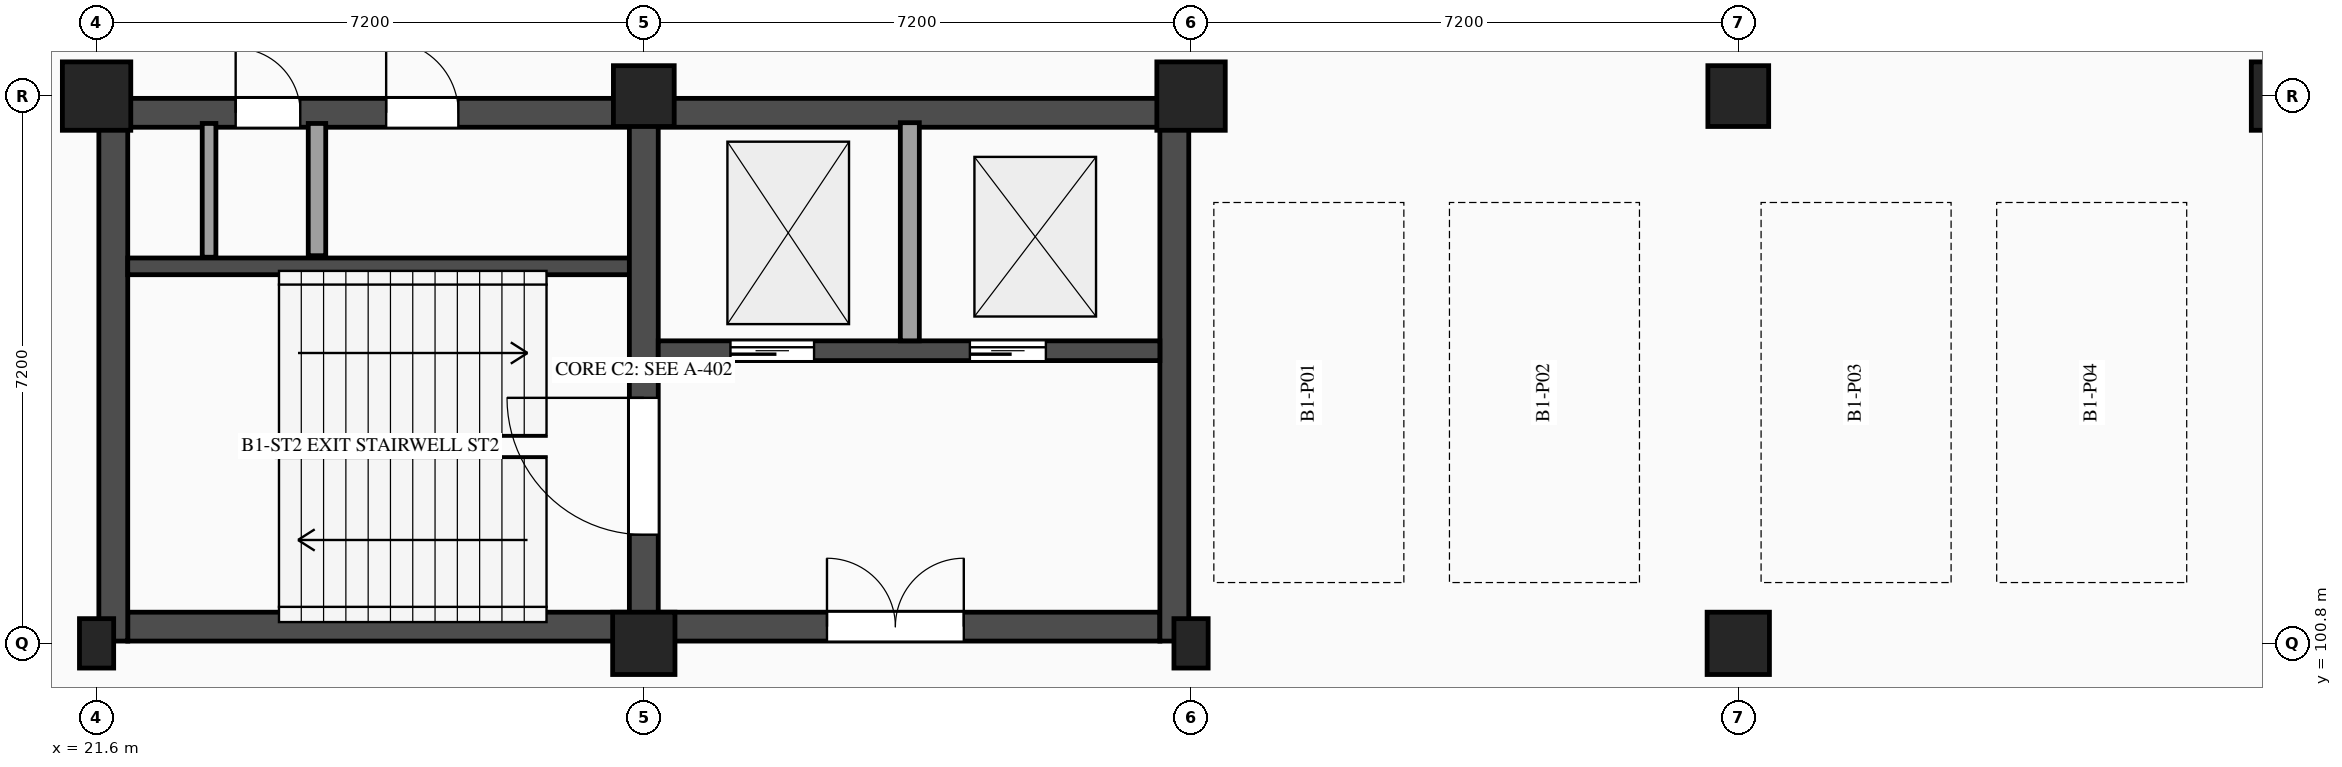
"""IFC4 building model, lengths in metres.
Left out: names, types, materials, properties, quantities, classifications, styles, units other than length and angle.
Written with IfcOpenShell. Run it as: python <this file> out.ifc"""

import sys

from ifc_helpers import new_model, si_unit, direction, frame, frame_2d, origin, origin_2d, place, context, subcontext, project, spatial, rectangle, extrude, element, fill, save


model = new_model("IFC4")
c1 = context("Model", 3, precision=1e-05, world=origin(), true_north=direction((0.0, 1.0)))
c2 = subcontext(c1, "Body", "Model", "MODEL_VIEW")
j1 = project(units=[si_unit("LENGTHUNIT", "METRE"), si_unit("PLANEANGLEUNIT", "RADIAN")], contexts=[c1])
p1 = place(None, origin())
s1 = spatial("IfcSite", under=j1, at=p1, CompositionType="ELEMENT")
p2 = place(p1, origin())
s2 = spatial("IfcBuilding", under=s1, at=p2, CompositionType="ELEMENT")
p3 = place(p2, frame((0.0, 0.0, -4.5)))
s3 = spatial("IfcBuildingStorey", under=s2, at=p3, CompositionType="ELEMENT", Elevation=-4.5)
p4 = place(p3, frame((21.6, 100.8, -0.45), z_axis=(0.0, 0.0, 1.0), x_axis=(1.0, 0.0, 0.0)))
e1 = element("IfcColumn", 1, at=p4, inside=s3, PredefinedType="PILASTER", context=c2, shape_type="SweptSolid", body=[
    extrude(rectangle(XDim=0.45, YDim=0.65, at=origin_2d()), origin(), (0.0, 0.0, 1.0), 4.95),
])
p5 = place(p3, frame((21.6, 108.0, -0.45), z_axis=(0.0, 0.0, 1.0), x_axis=(1.0, 0.0, 0.0)))
e2 = element("IfcColumn", 2, at=p5, inside=s3, PredefinedType="COLUMN", context=c2, shape_type="SweptSolid", body=[
    extrude(rectangle(XDim=0.9, YDim=0.9, at=origin_2d()), origin(), (0.0, 0.0, 1.0), 4.95),
])
p6 = place(p3, frame((28.8, 100.8, -0.45), z_axis=(0.0, 0.0, 1.0), x_axis=(1.0, 0.0, 0.0)))
e3 = element("IfcColumn", 3, at=p6, inside=s3, PredefinedType="COLUMN", context=c2, shape_type="SweptSolid", body=[
    extrude(rectangle(XDim=0.82, YDim=0.82, at=origin_2d()), origin(), (0.0, 0.0, 1.0), 4.95),
])
p7 = place(p3, frame((28.8, 108.0, -0.45), z_axis=(0.0, 0.0, 1.0), x_axis=(1.0, 0.0, 0.0)))
e4 = element("IfcColumn", 4, at=p7, inside=s3, PredefinedType="COLUMN", context=c2, shape_type="SweptSolid", body=[
    extrude(rectangle(XDim=0.8, YDim=0.8, at=origin_2d()), origin(), (0.0, 0.0, 1.0), 4.95),
])
p8 = place(p3, frame((36.0, 100.8, -0.45), z_axis=(0.0, 0.0, 1.0), x_axis=(1.0, 0.0, 0.0)))
e5 = element("IfcColumn", 5, at=p8, inside=s3, PredefinedType="PILASTER", context=c2, shape_type="SweptSolid", body=[
    extrude(rectangle(XDim=0.45, YDim=0.65, at=origin_2d()), origin(), (0.0, 0.0, 1.0), 4.95),
])
p9 = place(p3, frame((36.0, 108.0, -0.45), z_axis=(0.0, 0.0, 1.0), x_axis=(1.0, 0.0, 0.0)))
e6 = element("IfcColumn", 6, at=p9, inside=s3, PredefinedType="COLUMN", context=c2, shape_type="SweptSolid", body=[
    extrude(rectangle(XDim=0.9, YDim=0.9, at=origin_2d()), origin(), (0.0, 0.0, 1.0), 4.95),
])
p10 = place(p3, frame((43.2, 100.8, -0.45), z_axis=(0.0, 0.0, 1.0), x_axis=(1.0, 0.0, 0.0)))
e7 = element("IfcColumn", 7, at=p10, inside=s3, PredefinedType="COLUMN", context=c2, shape_type="SweptSolid", body=[
    extrude(rectangle(XDim=0.82, YDim=0.82, at=origin_2d()), origin(), (0.0, 0.0, 1.0), 4.95),
])
p11 = place(p3, frame((43.2, 108.0, -0.45), z_axis=(0.0, 0.0, 1.0), x_axis=(1.0, 0.0, 0.0)))
e8 = element("IfcColumn", 8, at=p11, inside=s3, PredefinedType="COLUMN", context=c2, shape_type="SweptSolid", body=[
    extrude(rectangle(XDim=0.8, YDim=0.8, at=origin_2d()), origin(), (0.0, 0.0, 1.0), 4.95),
])
p12 = place(p3, frame((50.4, 108.0, -0.45), z_axis=(0.0, 0.0, 1.0), x_axis=(1.0, 0.0, 0.0)))
e9 = element("IfcColumn", 9, at=p12, inside=s3, PredefinedType="COLUMN", context=c2, shape_type="SweptSolid", body=[
    extrude(rectangle(XDim=0.9, YDim=0.9, at=origin_2d()), origin(), (0.0, 0.0, 1.0), 4.95),
])
p13 = place(p3, frame((22.01, 101.02, 0.0), z_axis=(0.0, 0.0, 1.0), x_axis=(1.0, 0.0, 0.0)))
e10 = element("IfcWall", 10, at=p13, inside=s3, PredefinedType="SHEAR", context=c2, shape_type="SweptSolid", body=[
    extrude(rectangle(XDim=6.6, YDim=0.38, at=frame_2d((3.3, 0.0))), origin(), (0.0, 0.0, 1.0), 4.17),
])
p14 = place(p3, frame((21.82, 107.97, 0.0), z_axis=(0.0, 0.0, 1.0), x_axis=(0.0, -1.0, 0.0)))
e11 = element("IfcWall", 11, at=p14, inside=s3, PredefinedType="SHEAR", context=c2, shape_type="SweptSolid", body=[
    extrude(rectangle(XDim=7.14, YDim=0.38, at=frame_2d((3.57, 0.0))), origin(), (0.0, 0.0, 1.0), 4.17),
])
p15 = place(p3, frame((22.01, 107.78, 0.0), z_axis=(0.0, 0.0, 1.0), x_axis=(1.0, 0.0, 0.0)))
e12 = element("IfcWall", 12, at=p15, inside=s3, PredefinedType="SHEAR", context=c2, shape_type="SweptSolid", body=[
    extrude(rectangle(XDim=6.6, YDim=0.38, at=frame_2d((3.3, 0.0))), origin(), (0.0, 0.0, 1.0), 4.17),
])
p16 = place(p15, frame((1.42, 0.0, 0.0)))
e13 = element("IfcOpeningElement", 13, at=p16, cuts=e12, PredefinedType="OPENING", context=c2, shape_type="SweptSolid", body=[
    extrude(rectangle(XDim=0.85, YDim=2.1, at=frame_2d((0.425, 1.05))), frame((0.0, 0.2, 0.0), z_axis=(0.0, -1.0, 0.0), x_axis=(1.0, 0.0, 0.0)), (0.0, 0.0, 1.0), 0.4),
])
p17 = place(p15, frame((3.4, 0.0, 0.0)))
e14 = element("IfcOpeningElement", 14, at=p17, cuts=e12, PredefinedType="OPENING", context=c2, shape_type="SweptSolid", body=[
    extrude(rectangle(XDim=0.95, YDim=2.15, at=frame_2d((0.475, 1.075))), frame((0.0, 0.2, 0.0), z_axis=(0.0, -1.0, 0.0), x_axis=(1.0, 0.0, 0.0)), (0.0, 0.0, 1.0), 0.4),
])
p18 = place(p3, frame((22.01, 105.76, 0.0), z_axis=(0.0, 0.0, 1.0), x_axis=(1.0, 0.0, 0.0)))
e15 = element("IfcWall", 15, at=p18, inside=s3, PredefinedType="SHEAR", context=c2, shape_type="SweptSolid", body=[
    extrude(rectangle(XDim=6.6, YDim=0.22, at=frame_2d((3.3, 0.0))), origin(), (0.0, 0.0, 1.0), 4.17),
])
p19 = place(p3, frame((24.5, 105.9, 0.0), z_axis=(0.0, 0.0, 1.0), x_axis=(0.0, 1.0, 0.0)))
e16 = element("IfcWall", 16, at=p19, inside=s3, PredefinedType="PARTITIONING", context=c2, shape_type="SweptSolid", body=[
    extrude(rectangle(XDim=1.74, YDim=0.23, at=frame_2d((0.87, 0.0))), origin(), (0.0, 0.0, 1.0), 4.17),
])
p20 = place(p3, frame((23.08, 105.88, 0.0), z_axis=(0.0, 0.0, 1.0), x_axis=(0.0, 1.0, 0.0)))
e17 = element("IfcWall", 17, at=p20, inside=s3, PredefinedType="PARTITIONING", context=c2, shape_type="SweptSolid", body=[
    extrude(rectangle(XDim=1.76, YDim=0.18, at=frame_2d((0.88, 0.0))), origin(), (0.0, 0.0, 1.0), 4.17),
])
p21 = place(p3, frame((28.8, 100.83, 0.0), z_axis=(0.0, 0.0, 1.0), x_axis=(0.0, 1.0, 0.0)))
e18 = element("IfcWall", 18, at=p21, inside=s3, PredefinedType="SHEAR", context=c2, shape_type="SweptSolid", body=[
    extrude(rectangle(XDim=7.14, YDim=0.38, at=frame_2d((3.57, 0.0))), origin(), (0.0, 0.0, 1.0), 4.17),
])
p22 = place(p21, frame((1.4, 0.0, 0.0)))
e19 = element("IfcOpeningElement", 19, at=p22, cuts=e18, PredefinedType="OPENING", context=c2, shape_type="SweptSolid", body=[
    extrude(rectangle(XDim=1.8, YDim=2.2, at=frame_2d((0.9, 1.1))), frame((0.0, 0.2, 0.0), z_axis=(0.0, -1.0, 0.0), x_axis=(1.0, 0.0, 0.0)), (0.0, 0.0, 1.0), 0.4),
])
p23 = place(p3, frame((28.99, 101.02, 0.0), z_axis=(0.0, 0.0, 1.0), x_axis=(1.0, 0.0, 0.0)))
e20 = element("IfcWall", 20, at=p23, inside=s3, PredefinedType="SHEAR", context=c2, shape_type="SweptSolid", body=[
    extrude(rectangle(XDim=6.6, YDim=0.38, at=frame_2d((3.3, 0.0))), origin(), (0.0, 0.0, 1.0), 4.17),
])
p24 = place(p23, frame((2.22, 0.0, 0.0)))
e21 = element("IfcOpeningElement", 21, at=p24, cuts=e20, PredefinedType="OPENING", context=c2, shape_type="SweptSolid", body=[
    extrude(rectangle(XDim=1.8, YDim=2.2, at=frame_2d((0.9, 1.1))), frame((0.0, 0.2, 0.0), z_axis=(0.0, -1.0, 0.0), x_axis=(1.0, 0.0, 0.0)), (0.0, 0.0, 1.0), 0.4),
])
p25 = place(p3, frame((35.78, 100.83, 0.0), z_axis=(0.0, 0.0, 1.0), x_axis=(0.0, 1.0, 0.0)))
e22 = element("IfcWall", 22, at=p25, inside=s3, PredefinedType="SHEAR", context=c2, shape_type="SweptSolid", body=[
    extrude(rectangle(XDim=7.14, YDim=0.38, at=frame_2d((3.57, 0.0))), origin(), (0.0, 0.0, 1.0), 4.17),
])
p26 = place(p3, frame((28.99, 107.78, 0.0), z_axis=(0.0, 0.0, 1.0), x_axis=(1.0, 0.0, 0.0)))
e23 = element("IfcWall", 23, at=p26, inside=s3, PredefinedType="SHEAR", context=c2, shape_type="SweptSolid", body=[
    extrude(rectangle(XDim=6.6, YDim=0.38, at=frame_2d((3.3, 0.0))), origin(), (0.0, 0.0, 1.0), 4.17),
])
p27 = place(p3, frame((28.99, 104.65, 0.0), z_axis=(0.0, 0.0, 1.0), x_axis=(1.0, 0.0, 0.0)))
e24 = element("IfcWall", 24, at=p27, inside=s3, PredefinedType="SHEAR", context=c2, shape_type="SweptSolid", body=[
    extrude(rectangle(XDim=6.6, YDim=0.26, at=frame_2d((3.3, 0.0))), origin(), (0.0, 0.0, 1.0), 4.17),
])
p28 = place(p27, frame((0.95, 0.0, 0.0)))
e25 = element("IfcOpeningElement", 25, at=p28, cuts=e24, PredefinedType="OPENING", context=c2, shape_type="SweptSolid", body=[
    extrude(rectangle(XDim=1.1, YDim=2.2, at=frame_2d((0.55, 1.1))), frame((0.0, 0.14, 0.0), z_axis=(0.0, -1.0, 0.0), x_axis=(1.0, 0.0, 0.0)), (0.0, 0.0, 1.0), 0.28),
])
p29 = place(p27, frame((4.1, 0.0, 0.0)))
e26 = element("IfcOpeningElement", 26, at=p29, cuts=e24, PredefinedType="OPENING", context=c2, shape_type="SweptSolid", body=[
    extrude(rectangle(XDim=1.0, YDim=2.15, at=frame_2d((0.5, 1.075))), frame((0.0, 0.14, 0.0), z_axis=(0.0, -1.0, 0.0), x_axis=(1.0, 0.0, 0.0)), (0.0, 0.0, 1.0), 0.28),
])
p30 = place(p3, frame((32.3, 104.78, 0.0), z_axis=(0.0, 0.0, 1.0), x_axis=(0.0, 1.0, 0.0)))
e27 = element("IfcWall", 27, at=p30, inside=s3, PredefinedType="PARTITIONING", context=c2, shape_type="SweptSolid", body=[
    extrude(rectangle(XDim=2.87, YDim=0.25, at=frame_2d((1.435, 0.0))), origin(), (0.0, 0.0, 1.0), 4.17),
])
p31 = place(p16, origin())
e28 = element("IfcDoor", 28, at=p31, inside=s3, OperationType="SINGLE_SWING_LEFT", PredefinedType="DOOR", context=c2, shape_type="SweptSolid", body=[
    extrude(rectangle(XDim=0.85, YDim=2.1, at=frame_2d((0.425, 1.05))), frame((0.0, 0.025, 0.0), z_axis=(0.0, -1.0, 0.0), x_axis=(1.0, 0.0, 0.0)), (0.0, 0.0, 1.0), 0.05),
])
fill(e13, e28)
p32 = place(p22, origin())
e29 = element("IfcDoor", 29, at=p32, inside=s3, OperationType="SINGLE_SWING_RIGHT", PredefinedType="DOOR", context=c2, shape_type="SweptSolid", body=[
    extrude(rectangle(XDim=1.8, YDim=2.2, at=frame_2d((0.9, 1.1))), frame((0.0, 0.025, 0.0), z_axis=(0.0, -1.0, 0.0), x_axis=(1.0, 0.0, 0.0)), (0.0, 0.0, 1.0), 0.05),
])
fill(e19, e29)
p33 = place(p17, origin())
e30 = element("IfcDoor", 30, at=p33, inside=s3, OperationType="SINGLE_SWING_LEFT", PredefinedType="DOOR", context=c2, shape_type="SweptSolid", body=[
    extrude(rectangle(XDim=0.95, YDim=2.15, at=frame_2d((0.475, 1.075))), frame((0.0, 0.025, 0.0), z_axis=(0.0, -1.0, 0.0), x_axis=(1.0, 0.0, 0.0)), (0.0, 0.0, 1.0), 0.05),
])
fill(e14, e30)
p34 = place(p28, origin())
e31 = element("IfcDoor", 31, at=p34, inside=s3, OperationType="SLIDING_TO_LEFT", PredefinedType="DOOR", context=c2, shape_type="SweptSolid", body=[
    extrude(rectangle(XDim=1.1, YDim=2.2, at=frame_2d((0.55, 1.1))), frame((0.0, 0.025, 0.0), z_axis=(0.0, -1.0, 0.0), x_axis=(1.0, 0.0, 0.0)), (0.0, 0.0, 1.0), 0.05),
])
fill(e25, e31)
p35 = place(p29, origin())
e32 = element("IfcDoor", 32, at=p35, inside=s3, OperationType="SLIDING_TO_RIGHT", PredefinedType="DOOR", context=c2, shape_type="SweptSolid", body=[
    extrude(rectangle(XDim=1.0, YDim=2.15, at=frame_2d((0.5, 1.075))), frame((0.0, 0.025, 0.0), z_axis=(0.0, -1.0, 0.0), x_axis=(1.0, 0.0, 0.0)), (0.0, 0.0, 1.0), 0.05),
])
fill(e26, e32)
p36 = place(p24, origin())
e33 = element("IfcDoor", 33, at=p36, inside=s3, OperationType="DOUBLE_DOOR_SINGLE_SWING", PredefinedType="DOOR", context=c2, shape_type="SweptSolid", body=[
    extrude(rectangle(XDim=1.8, YDim=2.2, at=frame_2d((0.9, 1.1))), frame((0.0, 0.025, 0.0), z_axis=(0.0, -1.0, 0.0), x_axis=(1.0, 0.0, 0.0)), (0.0, 0.0, 1.0), 0.05),
])
fill(e21, e33)
save(model, sys.argv[1])
